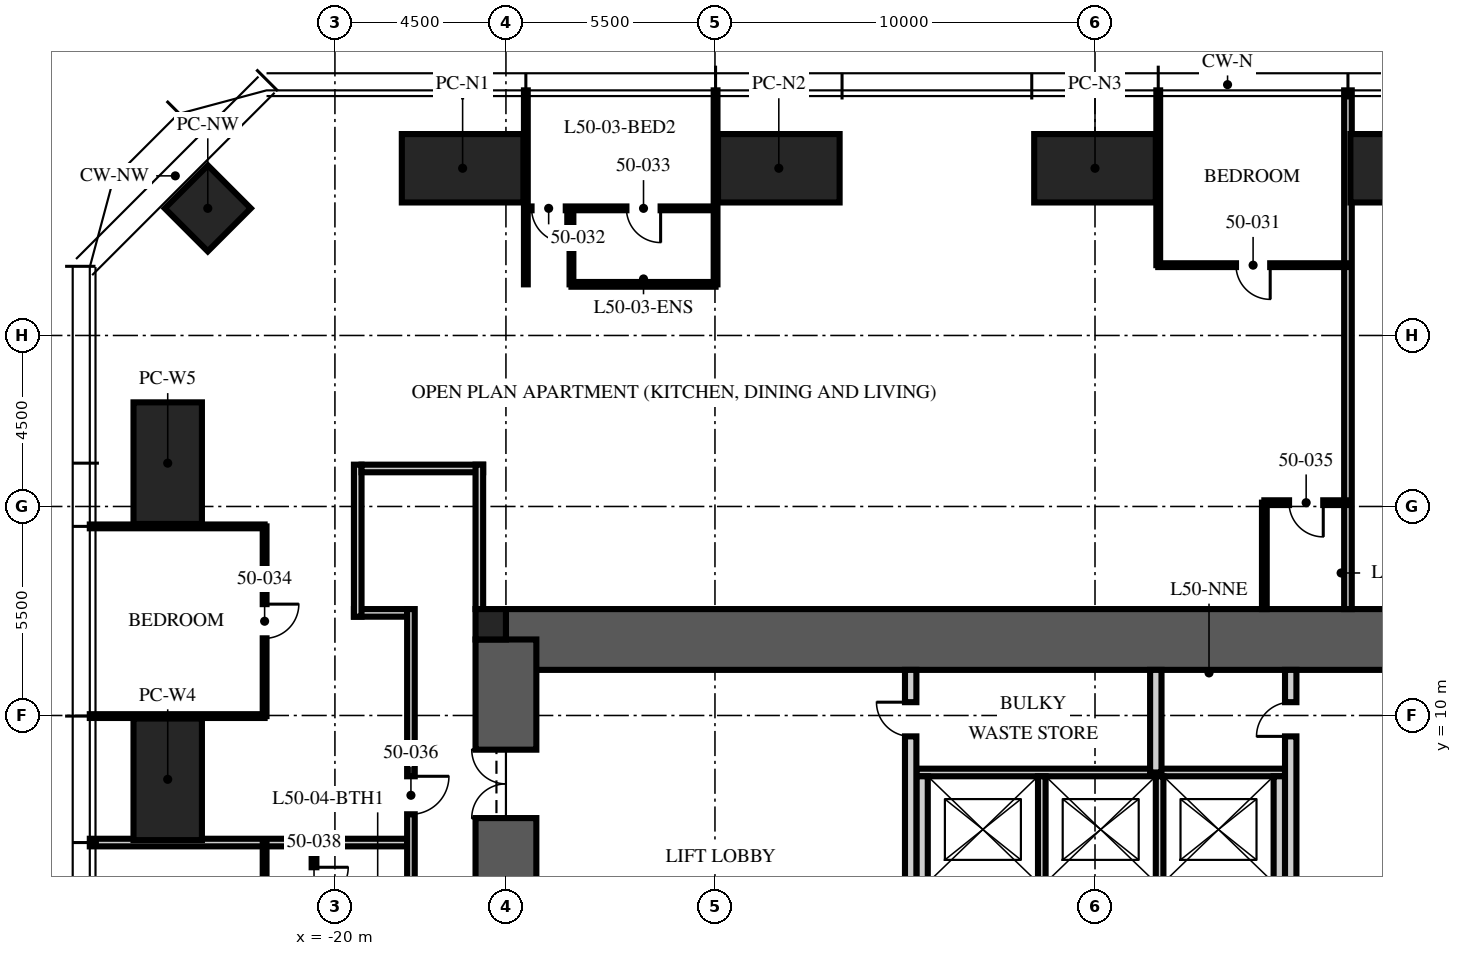
"""IFC4 building model, lengths in metres.
Left out: names, types, materials, properties, quantities, classifications, styles, units other than length and angle.
Written with IfcOpenShell. Run it as: python <this file> out.ifc"""

import sys

from ifc_helpers import new_model, si_unit, direction, frame, frame_2d, origin, origin_2d, place, context, subcontext, project, spatial, rectangle, hollow_rectangle, extrude, element, fill, save


model = new_model("IFC4")
c1 = context("Model", 3, precision=1e-05, world=origin(), true_north=direction((0.0, 1.0)))
c2 = subcontext(c1, "Body", "Model", "MODEL_VIEW")
j1 = project(units=[si_unit("LENGTHUNIT", "METRE"), si_unit("PLANEANGLEUNIT", "RADIAN")], contexts=[c1])
p1 = place(None, origin())
s1 = spatial("IfcSite", under=j1, at=p1, CompositionType="ELEMENT")
p2 = place(p1, origin())
s2 = spatial("IfcBuilding", under=s1, at=p2, CompositionType="ELEMENT")
p3 = place(p2, frame((0.0, 0.0, 203.25)))
s3 = spatial("IfcBuildingStorey", under=s2, at=p3, CompositionType="ELEMENT", Elevation=203.25)
p4 = place(p3, frame((-15.5, 12.0, -0.25), z_axis=(0.0, 0.0, 1.0), x_axis=(1.0, 0.0, 0.0)))
e1 = element("IfcWall", 1, at=p4, inside=s3, PredefinedType="SHEAR", context=c2, shape_type="SweptSolid", body=[
    extrude(rectangle(XDim=31.0, YDim=1.6, at=frame_2d((15.5, 0.0))), origin(), (0.0, 0.0, 1.0), 3.75),
])
p5 = place(p3, frame((-15.5, -12.0, -0.25), z_axis=(0.0, 0.0, 1.0), x_axis=(0.0, 1.0, 0.0)))
e2 = element("IfcWall", 2, at=p5, inside=s3, PredefinedType="SHEAR", context=c2, shape_type="SweptSolid", body=[
    extrude(rectangle(XDim=24.0, YDim=1.6, at=frame_2d((12.0, 0.0))), origin(), (0.0, 0.0, 1.0), 3.75),
])
p6 = place(p5, frame((3.2, 0.0, 0.25)))
e3 = element("IfcOpeningElement", 3, at=p6, cuts=e2, PredefinedType="OPENING", context=c2, shape_type="SweptSolid", body=[
    extrude(rectangle(XDim=1.2, YDim=2.1, at=frame_2d((0.6, 1.05))), frame((0.0, 0.81, 0.0), z_axis=(0.0, -1.0, 0.0), x_axis=(1.0, 0.0, 0.0)), (0.0, 0.0, 1.0), 1.62),
])
p7 = place(p5, frame((19.3, 0.0, 0.25)))
e4 = element("IfcOpeningElement", 4, at=p7, cuts=e2, PredefinedType="OPENING", context=c2, shape_type="SweptSolid", body=[
    extrude(rectangle(XDim=1.8, YDim=2.1, at=frame_2d((0.9, 1.05))), frame((0.0, 0.81, 0.0), z_axis=(0.0, -1.0, 0.0), x_axis=(1.0, 0.0, 0.0)), (0.0, 0.0, 1.0), 1.62),
])
p8 = place(p3, frame((-15.9, 12.4, -0.25), z_axis=(0.0, 0.0, 1.0), x_axis=(1.0, 0.0, 0.0)))
e5 = element("IfcColumn", 5, at=p8, inside=s3, PredefinedType="COLUMN", context=c2, shape_type="SweptSolid", body=[
    extrude(rectangle(XDim=0.8, YDim=0.8, at=origin_2d()), origin(), (0.0, 0.0, 1.0), 3.75),
])
for number, where, z_axis, x_axis in (
    (6, (-16.64, 24.4, 0.0), (0.0, 0.0, 1.0), (1.0, 0.0, 0.0)),
    (7, (-8.32, 24.4, 0.0), (0.0, 0.0, 1.0), (1.0, 0.0, 0.0)),
    (8, (0.0, 24.4, 0.0), (0.0, 0.0, 1.0), (1.0, 0.0, 0.0)),
    (9, (8.32, 24.4, 0.0), (0.0, 0.0, 1.0), (1.0, 0.0, 0.0)),
    (10, (-24.4, 8.32, 0.0), (0.0, 0.0, 1.0), (0.0, 1.0, 0.0)),
    (11, (-24.4, 16.64, 0.0), (0.0, 0.0, 1.0), (0.0, 1.0, 0.0)),
):
    element("IfcColumn", number, at=place(p3, frame(where, z_axis=z_axis, x_axis=x_axis)), inside=s3, PredefinedType="COLUMN", context=c2, shape_type="SweptSolid", body=[
        extrude(hollow_rectangle(XDim=3.2, YDim=1.8, WallThickness=0.2, at=origin_2d()), origin(), (0.0, 0.0, 1.0), 3.75),
    ])
p9 = place(p3, frame((-23.346, 23.346, 0.0), z_axis=(0.0, 0.0, 1.0), x_axis=(0.707106781187, 0.707106781187, 0.0)))
e12 = element("IfcColumn", 12, at=p9, inside=s3, PredefinedType="COLUMN", context=c2, shape_type="SweptSolid", body=[
    extrude(hollow_rectangle(XDim=1.6, YDim=1.6, WallThickness=0.1, at=origin_2d()), origin(), (0.0, 0.0, 1.0), 3.75),
])
p10 = place(p3, frame((-4.7, 8.5, 0.0), z_axis=(0.0, 0.0, 1.0), x_axis=(1.0, 0.0, 0.0)))
e13 = element("IfcWall", 13, at=p10, inside=s3, PredefinedType="PARTITIONING", context=c2, shape_type="SweptSolid", body=[
    extrude(rectangle(XDim=9.7, YDim=0.2, at=frame_2d((4.85, 0.0))), origin(), (0.0, 0.0, 1.0), 3.5),
])
for number, where, z_axis, x_axis in (
    (14, (-4.55, 5.6, 0.0), (0.0, 0.0, 1.0), (0.0, 1.0, 0.0)),
    (15, (4.85, 5.6, 0.0), (0.0, 0.0, 1.0), (0.0, 1.0, 0.0)),
):
    element("IfcWall", number, at=place(p3, frame(where, z_axis=z_axis, x_axis=x_axis)), inside=s3, PredefinedType="PARTITIONING", context=c2, shape_type="SweptSolid", body=[
        extrude(rectangle(XDim=2.8, YDim=0.3, at=frame_2d((1.4, 0.0))), origin(), (0.0, 0.0, 1.0), 3.5),
    ])
for number, where, z_axis, x_axis in (
    (16, (-1.4, 5.6, 0.0), (0.0, 0.0, 1.0), (0.0, 1.0, 0.0)),
    (17, (1.7, 5.6, 0.0), (0.0, 0.0, 1.0), (0.0, 1.0, 0.0)),
):
    element("IfcWall", number, at=place(p3, frame(where, z_axis=z_axis, x_axis=x_axis)), inside=s3, PredefinedType="PARTITIONING", context=c2, shape_type="SweptSolid", body=[
        extrude(rectangle(XDim=2.8, YDim=0.2, at=frame_2d((1.4, 0.0))), origin(), (0.0, 0.0, 1.0), 3.5),
    ])
p11 = place(p3, frame((-4.85, 5.3, 0.0), z_axis=(0.0, 0.0, 1.0), x_axis=(0.0, 1.0, 0.0)))
e18 = element("IfcWall", 18, at=p11, inside=s3, PredefinedType="PARTITIONING", context=c2, shape_type="SweptSolid", body=[
    extrude(rectangle(XDim=5.9, YDim=0.3, at=frame_2d((2.95, 0.0))), origin(), (0.0, 0.0, 1.0), 3.5),
])
p12 = place(p11, frame((4.15, 0.0, 0.0)))
e19 = element("IfcOpeningElement", 19, at=p12, cuts=e18, PredefinedType="OPENING", context=c2, shape_type="SweptSolid", body=[
    extrude(rectangle(XDim=0.9, YDim=2.1, at=frame_2d((0.45, 1.05))), frame((0.0, 0.16, 0.0), z_axis=(0.0, -1.0, 0.0), x_axis=(1.0, 0.0, 0.0)), (0.0, 0.0, 1.0), 0.32),
])
p13 = place(p3, frame((5.15, 5.3, 0.0), z_axis=(0.0, 0.0, 1.0), x_axis=(0.0, 1.0, 0.0)))
e20 = element("IfcWall", 20, at=p13, inside=s3, PredefinedType="PARTITIONING", context=c2, shape_type="SweptSolid", body=[
    extrude(rectangle(XDim=5.9, YDim=0.3, at=frame_2d((2.95, 0.0))), origin(), (0.0, 0.0, 1.0), 3.5),
])
p14 = place(p13, frame((4.15, 0.0, 0.0)))
e21 = element("IfcOpeningElement", 21, at=p14, cuts=e20, PredefinedType="OPENING", context=c2, shape_type="SweptSolid", body=[
    extrude(rectangle(XDim=0.9, YDim=2.1, at=frame_2d((0.45, 1.05))), frame((0.0, 0.16, 0.0), z_axis=(0.0, -1.0, 0.0), x_axis=(1.0, 0.0, 0.0)), (0.0, 0.0, 1.0), 0.32),
])
p15 = place(p3, frame((1.6, 8.5, 0.0), z_axis=(0.0, 0.0, 1.0), x_axis=(0.0, 1.0, 0.0)))
e22 = element("IfcWall", 22, at=p15, inside=s3, PredefinedType="PARTITIONING", context=c2, shape_type="SweptSolid", body=[
    extrude(rectangle(XDim=2.7, YDim=0.3, at=frame_2d((1.35, 0.0))), origin(), (0.0, 0.0, 1.0), 3.5),
])
p16 = place(p3, frame((-18.1, 12.7, 0.0), z_axis=(0.0, 0.0, 1.0), x_axis=(-1.0, 0.0, 0.0)))
e23 = element("IfcWall", 23, at=p16, inside=s3, PredefinedType="PARTITIONING", context=c2, shape_type="SweptSolid", body=[
    extrude(rectangle(XDim=1.4, YDim=0.2, at=frame_2d((0.7, 0.0))), origin(), (0.0, 0.0, 1.0), 2.81),
])
p17 = place(p3, frame((-19.4, 12.6, 0.0), z_axis=(0.0, 0.0, 1.0), x_axis=(0.0, 1.0, 0.0)))
e24 = element("IfcWall", 24, at=p17, inside=s3, PredefinedType="PARTITIONING", context=c2, shape_type="SweptSolid", body=[
    extrude(rectangle(XDim=4.0, YDim=0.2, at=frame_2d((2.0, 0.0))), origin(), (0.0, 0.0, 1.0), 2.6),
])
p18 = place(p3, frame((-19.3, 16.5, 0.0), z_axis=(0.0, 0.0, 1.0), x_axis=(1.0, 0.0, 0.0)))
e25 = element("IfcWall", 25, at=p18, inside=s3, PredefinedType="PARTITIONING", context=c2, shape_type="SweptSolid", body=[
    extrude(rectangle(XDim=3.2, YDim=0.2, at=frame_2d((1.6, 0.0))), origin(), (0.0, 0.0, 1.0), 2.3),
])
p19 = place(p3, frame((-16.2, 16.6, 0.0), z_axis=(0.0, 0.0, 1.0), x_axis=(0.0, -1.0, 0.0)))
e26 = element("IfcWall", 26, at=p19, inside=s3, PredefinedType="PARTITIONING", context=c2, shape_type="SweptSolid", body=[
    extrude(rectangle(XDim=3.8, YDim=0.2, at=frame_2d((1.9, 0.0))), origin(), (0.0, 0.0, 1.0), 2.3),
])
p20 = place(p3, frame((6.656, 12.8, 0.0), z_axis=(0.0, 0.0, 1.0), x_axis=(0.0, 1.0, 0.0)))
e27 = element("IfcWall", 27, at=p20, inside=s3, PredefinedType="PARTITIONING", context=c2, shape_type="SweptSolid", body=[
    extrude(rectangle(XDim=13.65, YDim=0.2, at=frame_2d((6.825, 0.0))), origin(), (0.0, 0.0, 1.0), 2.91),
])
p21 = place(p3, frame((1.664, 21.85, 0.0), z_axis=(0.0, 0.0, 1.0), x_axis=(0.0, 1.0, 0.0)))
e28 = element("IfcWall", 28, at=p21, inside=s3, PredefinedType="PARTITIONING", context=c2, shape_type="SweptSolid", body=[
    extrude(rectangle(XDim=4.6, YDim=0.1, at=frame_2d((2.3, 0.0))), origin(), (0.0, 0.0, 1.0), 2.91),
])
for number, where, z_axis, x_axis in (
    (29, (-9.984, 21.345, 0.0), (0.0, 0.0, 1.0), (0.0, 1.0, 0.0)),
    (30, (-14.976, 21.345, 0.0), (0.0, 0.0, 1.0), (0.0, 1.0, 0.0)),
):
    element("IfcWall", number, at=place(p3, frame(where, z_axis=z_axis, x_axis=x_axis)), inside=s3, PredefinedType="PARTITIONING", context=c2, shape_type="SweptSolid", body=[
        extrude(rectangle(XDim=5.105, YDim=0.1, at=frame_2d((2.552, 0.0))), origin(), (0.0, 0.0, 1.0), 2.91),
    ])
for number, where, z_axis, x_axis in (
    (31, (-21.85, 14.976, 0.0), (0.0, 0.0, 1.0), (-1.0, 0.0, 0.0)),
    (32, (-21.85, 9.984, 0.0), (0.0, 0.0, 1.0), (-1.0, 0.0, 0.0)),
):
    element("IfcWall", number, at=place(p3, frame(where, z_axis=z_axis, x_axis=x_axis)), inside=s3, PredefinedType="PARTITIONING", context=c2, shape_type="SweptSolid", body=[
        extrude(rectangle(XDim=4.6, YDim=0.1, at=frame_2d((2.3, 0.0))), origin(), (0.0, 0.0, 1.0), 2.91),
    ])
p22 = place(p3, frame((-18.1, 6.656, 0.0), z_axis=(0.0, 0.0, 1.0), x_axis=(-1.0, 0.0, 0.0)))
e33 = element("IfcWall", 33, at=p22, inside=s3, PredefinedType="PARTITIONING", context=c2, shape_type="SweptSolid", body=[
    extrude(rectangle(XDim=8.35, YDim=0.2, at=frame_2d((4.175, 0.0))), origin(), (0.0, 0.0, 1.0), 2.91),
])
p23 = place(p3, frame((6.656, 21.85, 0.0), z_axis=(0.0, 0.0, 1.0), x_axis=(-1.0, 0.0, 0.0)))
e34 = element("IfcWall", 34, at=p23, inside=s3, PredefinedType="PARTITIONING", context=c2, shape_type="SweptSolid", body=[
    extrude(rectangle(XDim=4.992, YDim=0.1, at=frame_2d((2.496, 0.0))), origin(), (0.0, 0.0, 1.0), 2.81),
])
p24 = place(p23, frame((2.046, 0.0, 0.0)))
e35 = element("IfcOpeningElement", 35, at=p24, cuts=e34, PredefinedType="OPENING", context=c2, shape_type="SweptSolid", body=[
    extrude(rectangle(XDim=0.9, YDim=2.1, at=frame_2d((0.45, 1.05))), frame((0.0, 0.06, 0.0), z_axis=(0.0, -1.0, 0.0), x_axis=(1.0, 0.0, 0.0)), (0.0, 0.0, 1.0), 0.12),
])
p25 = place(p3, frame((-9.984, 23.345, 0.0), z_axis=(0.0, 0.0, 1.0), x_axis=(-1.0, 0.0, 0.0)))
e36 = element("IfcWall", 36, at=p25, inside=s3, PredefinedType="PARTITIONING", context=c2, shape_type="SweptSolid", body=[
    extrude(rectangle(XDim=4.992, YDim=0.1, at=frame_2d((2.496, 0.0))), origin(), (0.0, 0.0, 1.0), 2.81),
])
p26 = place(p25, frame((3.942, 0.0, 0.0)))
e37 = element("IfcOpeningElement", 37, at=p26, cuts=e36, PredefinedType="OPENING", context=c2, shape_type="SweptSolid", body=[
    extrude(rectangle(XDim=0.9, YDim=2.1, at=frame_2d((0.45, 1.05))), frame((0.0, 0.06, 0.0), z_axis=(0.0, -1.0, 0.0), x_axis=(1.0, 0.0, 0.0)), (0.0, 0.0, 1.0), 0.12),
])
p27 = place(p25, frame((1.446, 0.0, 0.0)))
e38 = element("IfcOpeningElement", 38, at=p27, cuts=e36, PredefinedType="OPENING", context=c2, shape_type="SweptSolid", body=[
    extrude(rectangle(XDim=0.9, YDim=2.1, at=frame_2d((0.45, 1.05))), frame((0.0, 0.06, 0.0), z_axis=(0.0, -1.0, 0.0), x_axis=(1.0, 0.0, 0.0)), (0.0, 0.0, 1.0), 0.12),
])
p28 = place(p3, frame((-13.776, 21.345, 0.0), z_axis=(0.0, 0.0, 1.0), x_axis=(0.0, 1.0, 0.0)))
e39 = element("IfcWall", 39, at=p28, inside=s3, PredefinedType="PARTITIONING", context=c2, shape_type="SweptSolid", body=[
    extrude(rectangle(XDim=2.0, YDim=0.1, at=frame_2d((1.0, 0.0))), origin(), (0.0, 0.0, 1.0), 3.5),
])
p29 = place(p3, frame((-9.984, 21.345, 0.0), z_axis=(0.0, 0.0, 1.0), x_axis=(-1.0, 0.0, 0.0)))
e40 = element("IfcWall", 40, at=p29, inside=s3, PredefinedType="PARTITIONING", context=c2, shape_type="SweptSolid", body=[
    extrude(rectangle(XDim=3.792, YDim=0.125, at=frame_2d((1.896, 0.0))), origin(), (0.0, 0.0, 1.0), 2.81),
])
p30 = place(p3, frame((-21.85, 14.976, 0.0), z_axis=(0.0, 0.0, 1.0), x_axis=(0.0, -1.0, 0.0)))
e41 = element("IfcWall", 41, at=p30, inside=s3, PredefinedType="PARTITIONING", context=c2, shape_type="SweptSolid", body=[
    extrude(rectangle(XDim=4.992, YDim=0.1, at=frame_2d((2.496, 0.0))), origin(), (0.0, 0.0, 1.0), 2.81),
])
p31 = place(p30, frame((2.046, 0.0, 0.0)))
e42 = element("IfcOpeningElement", 42, at=p31, cuts=e41, PredefinedType="OPENING", context=c2, shape_type="SweptSolid", body=[
    extrude(rectangle(XDim=0.9, YDim=2.1, at=frame_2d((0.45, 1.05))), frame((0.0, 0.06, 0.0), z_axis=(0.0, -1.0, 0.0), x_axis=(1.0, 0.0, 0.0)), (0.0, 0.0, 1.0), 0.12),
])
p32 = place(p3, frame((6.656, 15.6, 0.0), z_axis=(0.0, 0.0, 1.0), x_axis=(-1.0, 0.0, 0.0)))
e43 = element("IfcWall", 43, at=p32, inside=s3, PredefinedType="PARTITIONING", context=c2, shape_type="SweptSolid", body=[
    extrude(rectangle(XDim=2.2, YDim=0.125, at=frame_2d((1.1, 0.0))), origin(), (0.0, 0.0, 1.0), 3.5),
])
p33 = place(p32, frame((0.65, 0.0, 0.0)))
e44 = element("IfcOpeningElement", 44, at=p33, cuts=e43, PredefinedType="OPENING", context=c2, shape_type="SweptSolid", body=[
    extrude(rectangle(XDim=0.9, YDim=2.1, at=frame_2d((0.45, 1.05))), frame((0.0, 0.073, 0.0), z_axis=(0.0, -1.0, 0.0), x_axis=(1.0, 0.0, 0.0)), (0.0, 0.0, 1.0), 0.145),
])
p34 = place(p3, frame((4.456, 12.8, 0.0), z_axis=(0.0, 0.0, 1.0), x_axis=(0.0, 1.0, 0.0)))
e45 = element("IfcWall", 45, at=p34, inside=s3, PredefinedType="PARTITIONING", context=c2, shape_type="SweptSolid", body=[
    extrude(rectangle(XDim=2.8, YDim=0.125, at=frame_2d((1.4, 0.0))), origin(), (0.0, 0.0, 1.0), 3.5),
])
p35 = place(p3, frame((-21.85, 6.656, 0.0), z_axis=(0.0, 0.0, 1.0), x_axis=(0.0, -1.0, 0.0)))
e46 = element("IfcWall", 46, at=p35, inside=s3, PredefinedType="PARTITIONING", context=c2, shape_type="SweptSolid", body=[
    extrude(rectangle(XDim=4.992, YDim=0.1, at=frame_2d((2.496, 0.0))), origin(), (0.0, 0.0, 1.0), 2.81),
])
p36 = place(p35, frame((2.046, 0.0, 0.0)))
e47 = element("IfcOpeningElement", 47, at=p36, cuts=e46, PredefinedType="OPENING", context=c2, shape_type="SweptSolid", body=[
    extrude(rectangle(XDim=0.9, YDim=2.1, at=frame_2d((0.45, 1.05))), frame((0.0, 0.06, 0.0), z_axis=(0.0, -1.0, 0.0), x_axis=(1.0, 0.0, 0.0)), (0.0, 0.0, 1.0), 0.12),
])
p37 = place(p3, frame((-20.55, 6.656, 0.0), z_axis=(0.0, 0.0, 1.0), x_axis=(0.0, -1.0, 0.0)))
e48 = element("IfcWall", 48, at=p37, inside=s3, PredefinedType="PARTITIONING", context=c2, shape_type="SweptSolid", body=[
    extrude(rectangle(XDim=2.2, YDim=0.125, at=frame_2d((1.1, 0.0))), origin(), (0.0, 0.0, 1.0), 3.5),
])
p38 = place(p37, frame((0.65, 0.0, 0.0)))
e49 = element("IfcOpeningElement", 49, at=p38, cuts=e48, PredefinedType="OPENING", context=c2, shape_type="SweptSolid", body=[
    extrude(rectangle(XDim=0.9, YDim=2.1, at=frame_2d((0.45, 1.05))), frame((0.0, 0.073, 0.0), z_axis=(0.0, -1.0, 0.0), x_axis=(1.0, 0.0, 0.0)), (0.0, 0.0, 1.0), 0.145),
])
p39 = place(p3, frame((-18.0, 12.8, 0.0), z_axis=(0.0, 0.0, 1.0), x_axis=(0.0, -1.0, 0.0)))
e50 = element("IfcWall", 50, at=p39, inside=s3, PredefinedType="PARTITIONING", context=c2, shape_type="SweptSolid", body=[
    extrude(rectangle(XDim=25.8, YDim=0.2, at=frame_2d((12.9, 0.0))), origin(), (0.0, 0.0, 1.0), 2.6),
])
p40 = place(p39, frame((4.4, 0.0, 0.0)))
e51 = element("IfcOpeningElement", 51, at=p40, cuts=e50, PredefinedType="OPENING", context=c2, shape_type="SweptSolid", body=[
    extrude(rectangle(XDim=1.0, YDim=2.2, at=frame_2d((0.5, 1.1))), frame((0.0, 0.11, 0.0), z_axis=(0.0, -1.0, 0.0), x_axis=(1.0, 0.0, 0.0)), (0.0, 0.0, 1.0), 0.22),
])
p41 = place(p39, frame((17.914, 0.0, 0.0)))
e52 = element("IfcOpeningElement", 52, at=p41, cuts=e50, PredefinedType="OPENING", context=c2, shape_type="SweptSolid", body=[
    extrude(rectangle(XDim=1.0, YDim=2.2, at=frame_2d((0.5, 1.1))), frame((0.0, 0.11, 0.0), z_axis=(0.0, -1.0, 0.0), x_axis=(1.0, 0.0, 0.0)), (0.0, 0.0, 1.0), 0.22),
])
p42 = place(p39, frame((23.476, 0.0, 0.0)))
e53 = element("IfcOpeningElement", 53, at=p42, cuts=e50, PredefinedType="OPENING", context=c2, shape_type="SweptSolid", body=[
    extrude(rectangle(XDim=1.0, YDim=2.2, at=frame_2d((0.5, 1.1))), frame((0.0, 0.11, 0.0), z_axis=(0.0, -1.0, 0.0), x_axis=(1.0, 0.0, 0.0)), (0.0, 0.0, 1.0), 0.22),
])
p43 = place(p7, origin())
e54 = element("IfcDoor", 54, at=p43, inside=s3, OperationType="DOUBLE_DOOR_SINGLE_SWING", PredefinedType="DOOR", context=c2, shape_type="SweptSolid", body=[
    extrude(rectangle(XDim=1.8, YDim=2.1, at=frame_2d((0.9, 1.05))), frame((0.0, 0.025, 0.0), z_axis=(0.0, -1.0, 0.0), x_axis=(1.0, 0.0, 0.0)), (0.0, 0.0, 1.0), 0.05),
])
fill(e4, e54)
p44 = place(p12, origin())
e55 = element("IfcDoor", 55, at=p44, inside=s3, OperationType="SINGLE_SWING_RIGHT", PredefinedType="DOOR", context=c2, shape_type="SweptSolid", body=[
    extrude(rectangle(XDim=0.9, YDim=2.1, at=frame_2d((0.45, 1.05))), frame((0.0, 0.025, 0.0), z_axis=(0.0, -1.0, 0.0), x_axis=(1.0, 0.0, 0.0)), (0.0, 0.0, 1.0), 0.05),
])
fill(e19, e55)
p45 = place(p14, origin())
e56 = element("IfcDoor", 56, at=p45, inside=s3, OperationType="SINGLE_SWING_LEFT", PredefinedType="DOOR", context=c2, shape_type="SweptSolid", body=[
    extrude(rectangle(XDim=0.9, YDim=2.1, at=frame_2d((0.45, 1.05))), frame((0.0, 0.025, 0.0), z_axis=(0.0, -1.0, 0.0), x_axis=(1.0, 0.0, 0.0)), (0.0, 0.0, 1.0), 0.05),
])
fill(e21, e56)
p46 = place(p24, origin())
e57 = element("IfcDoor", 57, at=p46, inside=s3, OperationType="SINGLE_SWING_LEFT", PredefinedType="DOOR", context=c2, shape_type="SweptSolid", body=[
    extrude(rectangle(XDim=0.9, YDim=2.1, at=frame_2d((0.45, 1.05))), frame((0.0, 0.025, 0.0), z_axis=(0.0, -1.0, 0.0), x_axis=(1.0, 0.0, 0.0)), (0.0, 0.0, 1.0), 0.05),
])
fill(e35, e57)
p47 = place(p26, origin())
e58 = element("IfcDoor", 58, at=p47, inside=s3, OperationType="SINGLE_SWING_LEFT", PredefinedType="DOOR", context=c2, shape_type="SweptSolid", body=[
    extrude(rectangle(XDim=0.9, YDim=2.1, at=frame_2d((0.45, 1.05))), frame((0.0, 0.025, 0.0), z_axis=(0.0, -1.0, 0.0), x_axis=(1.0, 0.0, 0.0)), (0.0, 0.0, 1.0), 0.05),
])
fill(e37, e58)
p48 = place(p27, origin())
e59 = element("IfcDoor", 59, at=p48, inside=s3, OperationType="SINGLE_SWING_LEFT", PredefinedType="DOOR", context=c2, shape_type="SweptSolid", body=[
    extrude(rectangle(XDim=0.9, YDim=2.1, at=frame_2d((0.45, 1.05))), frame((0.0, 0.025, 0.0), z_axis=(0.0, -1.0, 0.0), x_axis=(1.0, 0.0, 0.0)), (0.0, 0.0, 1.0), 0.05),
])
fill(e38, e59)
p49 = place(p31, origin())
e60 = element("IfcDoor", 60, at=p49, inside=s3, OperationType="SINGLE_SWING_LEFT", PredefinedType="DOOR", context=c2, shape_type="SweptSolid", body=[
    extrude(rectangle(XDim=0.9, YDim=2.1, at=frame_2d((0.45, 1.05))), frame((0.0, 0.025, 0.0), z_axis=(0.0, -1.0, 0.0), x_axis=(1.0, 0.0, 0.0)), (0.0, 0.0, 1.0), 0.05),
])
fill(e42, e60)
p50 = place(p33, origin())
e61 = element("IfcDoor", 61, at=p50, inside=s3, OperationType="SINGLE_SWING_LEFT", PredefinedType="DOOR", context=c2, shape_type="SweptSolid", body=[
    extrude(rectangle(XDim=0.9, YDim=2.1, at=frame_2d((0.45, 1.05))), frame((0.0, 0.025, 0.0), z_axis=(0.0, -1.0, 0.0), x_axis=(1.0, 0.0, 0.0)), (0.0, 0.0, 1.0), 0.05),
])
fill(e44, e61)
p51 = place(p40, origin())
e62 = element("IfcDoor", 62, at=p51, inside=s3, OperationType="SINGLE_SWING_LEFT", PredefinedType="DOOR", context=c2, shape_type="SweptSolid", body=[
    extrude(rectangle(XDim=1.0, YDim=2.2, at=frame_2d((0.5, 1.1))), frame((0.0, 0.025, 0.0), z_axis=(0.0, -1.0, 0.0), x_axis=(1.0, 0.0, 0.0)), (0.0, 0.0, 1.0), 0.05),
])
fill(e51, e62)
p52 = place(p38, origin())
e63 = element("IfcDoor", 63, at=p52, inside=s3, OperationType="SINGLE_SWING_LEFT", PredefinedType="DOOR", context=c2, shape_type="SweptSolid", body=[
    extrude(rectangle(XDim=0.9, YDim=2.1, at=frame_2d((0.45, 1.05))), frame((0.0, 0.025, 0.0), z_axis=(0.0, -1.0, 0.0), x_axis=(1.0, 0.0, 0.0)), (0.0, 0.0, 1.0), 0.05),
])
fill(e49, e63)
save(model, sys.argv[1])
